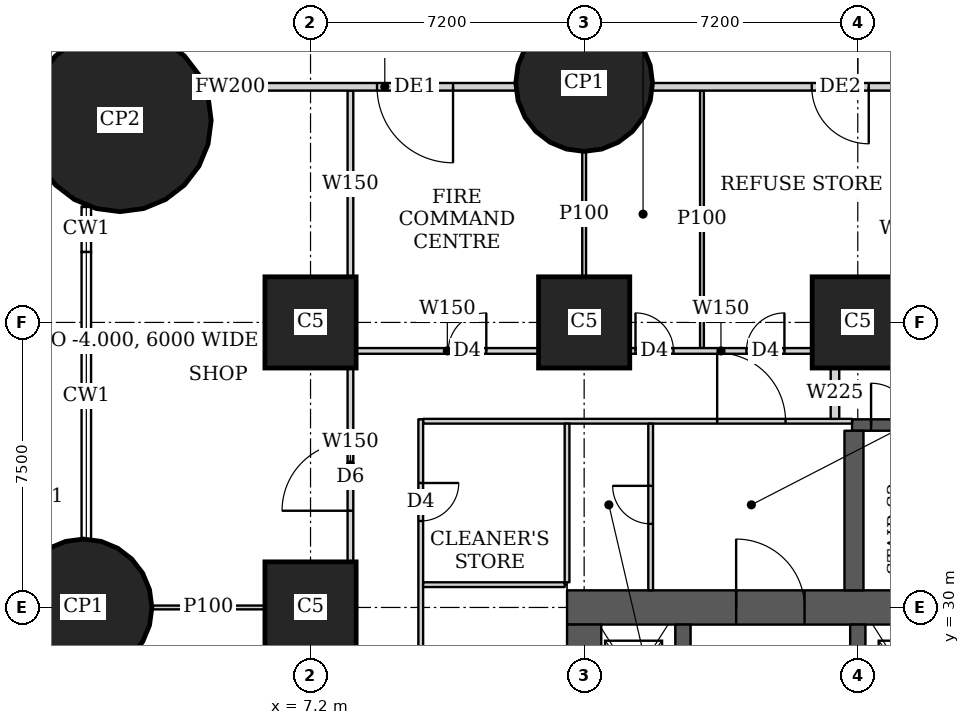
"""IFC4 building model, lengths in metres.
Left out: names, types, materials, properties, quantities, classifications, styles, units other than length and angle.
Written with IfcOpenShell. Run it as: python <this file> out.ifc"""

import sys

from ifc_helpers import new_model, si_unit, direction, frame, frame_2d, origin, origin_2d, place, context, subcontext, project, spatial, rectangle, circle, extrude, element, fill, save


model = new_model("IFC4")
c1 = context("Model", 3, precision=1e-05, world=origin(), true_north=direction((0.0, 1.0)))
c2 = subcontext(c1, "Body", "Model", "MODEL_VIEW")
j1 = project(units=[si_unit("LENGTHUNIT", "METRE"), si_unit("PLANEANGLEUNIT", "RADIAN")], contexts=[c1])
p1 = place(None, origin())
s1 = spatial("IfcSite", under=j1, at=p1, CompositionType="ELEMENT")
p2 = place(p1, origin())
s2 = spatial("IfcBuilding", under=s1, at=p2, CompositionType="ELEMENT")
p3 = place(p2, origin())
s3 = spatial("IfcBuildingStorey", under=s2, at=p3, CompositionType="ELEMENT", Elevation=0.0)
p4 = place(p3, frame((1.225, 30.0, 0.0), z_axis=(0.0, 0.0, 1.0), x_axis=(1.0, 0.0, 0.0)))
e1 = element("IfcColumn", 1, at=p4, inside=s3, PredefinedType="COLUMN", context=c2, shape_type="SweptSolid", body=[
    extrude(circle(Radius=1.8, at=origin_2d()), origin(), (0.0, 0.0, 1.0), 5.6),
])
for number, where, z_axis, x_axis in (
    (2, (7.2, 30.0, 0.0), (0.0, 0.0, 1.0), (1.0, 0.0, 0.0)),
    (3, (7.2, 37.5, 0.0), (0.0, 0.0, 1.0), (1.0, 0.0, 0.0)),
    (4, (14.4, 37.5, 0.0), (0.0, 0.0, 1.0), (1.0, 0.0, 0.0)),
    (5, (21.6, 37.5, 0.0), (0.0, 0.0, 1.0), (1.0, 0.0, 0.0)),
):
    element("IfcColumn", number, at=place(p3, frame(where, z_axis=z_axis, x_axis=x_axis)), inside=s3, PredefinedType="COLUMN", context=c2, shape_type="SweptSolid", body=[
        extrude(rectangle(XDim=2.4, YDim=2.4, at=origin_2d()), origin(), (0.0, 0.0, 1.0), 5.6),
    ])
p5 = place(p3, frame((2.186, 42.814, 0.0), z_axis=(0.0, 0.0, 1.0), x_axis=(1.0, 0.0, 0.0)))
e6 = element("IfcColumn", 6, at=p5, inside=s3, PredefinedType="COLUMN", context=c2, shape_type="SweptSolid", body=[
    extrude(circle(Radius=2.4, at=origin_2d()), origin(), (0.0, 0.0, 1.0), 5.6),
])
p6 = place(p3, frame((14.4, 43.8, 0.0), z_axis=(0.0, 0.0, 1.0), x_axis=(1.0, 0.0, 0.0)))
e7 = element("IfcColumn", 7, at=p6, inside=s3, PredefinedType="COLUMN", context=c2, shape_type="SweptSolid", body=[
    extrude(circle(Radius=1.8, at=origin_2d()), origin(), (0.0, 0.0, 1.0), 5.6),
])
p7 = place(p3, frame((13.95, 30.0, 0.0), z_axis=(0.0, 0.0, 1.0), x_axis=(1.0, 0.0, 0.0)))
e8 = element("IfcWall", 8, at=p7, inside=s3, PredefinedType="SHEAR", context=c2, shape_type="SweptSolid", body=[
    extrude(rectangle(XDim=15.3, YDim=0.9, at=frame_2d((7.65, 0.0))), origin(), (0.0, 0.0, 1.0), 5.6),
])
p8 = place(p7, frame((4.45, 0.0, 0.0)))
e9 = element("IfcOpeningElement", 9, at=p8, cuts=e8, PredefinedType="OPENING", context=c2, shape_type="SweptSolid", body=[
    extrude(rectangle(XDim=1.8, YDim=2.1, at=frame_2d((0.9, 1.05))), frame((0.0, 0.46, 0.0), z_axis=(0.0, -1.0, 0.0), x_axis=(1.0, 0.0, 0.0)), (0.0, 0.0, 1.0), 0.92),
])
p9 = place(p7, frame((10.7, 0.0, 0.0)))
e10 = element("IfcOpeningElement", 10, at=p9, cuts=e8, PredefinedType="OPENING", context=c2, shape_type="SweptSolid", body=[
    extrude(rectangle(XDim=1.1, YDim=2.1, at=frame_2d((0.55, 1.05))), frame((0.0, 0.46, 0.0), z_axis=(0.0, -1.0, 0.0), x_axis=(1.0, 0.0, 0.0)), (0.0, 0.0, 1.0), 0.92),
])
p10 = place(p3, frame((14.4, 15.45, 0.0), z_axis=(0.0, 0.0, 1.0), x_axis=(0.0, 1.0, 0.0)))
e11 = element("IfcWall", 11, at=p10, inside=s3, PredefinedType="SHEAR", context=c2, shape_type="SweptSolid", body=[
    extrude(rectangle(XDim=14.1, YDim=0.9, at=frame_2d((7.05, 0.0))), origin(), (0.0, 0.0, 1.0), 5.6),
])
p11 = place(p3, frame((17.0, 15.45, 0.0), z_axis=(0.0, 0.0, 1.0), x_axis=(0.0, 1.0, 0.0)))
e12 = element("IfcWall", 12, at=p11, inside=s3, PredefinedType="SHEAR", context=c2, shape_type="SweptSolid", body=[
    extrude(rectangle(XDim=14.1, YDim=0.4, at=frame_2d((7.05, 0.0))), origin(), (0.0, 0.0, 1.0), 5.6),
])
p12 = place(p11, frame((0.875, 0.0, 0.0)))
e13 = element("IfcOpeningElement", 13, at=p12, cuts=e12, PredefinedType="OPENING", context=c2, shape_type="SweptSolid", body=[
    extrude(rectangle(XDim=1.1, YDim=2.1, at=frame_2d((0.55, 1.05))), frame((0.0, 0.21, 0.0), z_axis=(0.0, -1.0, 0.0), x_axis=(1.0, 0.0, 0.0)), (0.0, 0.0, 1.0), 0.42),
])
p13 = place(p11, frame((4.625, 0.0, 0.0)))
e14 = element("IfcOpeningElement", 14, at=p13, cuts=e12, PredefinedType="OPENING", context=c2, shape_type="SweptSolid", body=[
    extrude(rectangle(XDim=1.1, YDim=2.1, at=frame_2d((0.55, 1.05))), frame((0.0, 0.21, 0.0), z_axis=(0.0, -1.0, 0.0), x_axis=(1.0, 0.0, 0.0)), (0.0, 0.0, 1.0), 0.42),
])
p14 = place(p11, frame((8.375, 0.0, 0.0)))
e15 = element("IfcOpeningElement", 15, at=p14, cuts=e12, PredefinedType="OPENING", context=c2, shape_type="SweptSolid", body=[
    extrude(rectangle(XDim=1.1, YDim=2.1, at=frame_2d((0.55, 1.05))), frame((0.0, 0.21, 0.0), z_axis=(0.0, -1.0, 0.0), x_axis=(1.0, 0.0, 0.0)), (0.0, 0.0, 1.0), 0.42),
])
p15 = place(p11, frame((12.125, 0.0, 0.0)))
e16 = element("IfcOpeningElement", 16, at=p15, cuts=e12, PredefinedType="OPENING", context=c2, shape_type="SweptSolid", body=[
    extrude(rectangle(XDim=1.1, YDim=2.1, at=frame_2d((0.55, 1.05))), frame((0.0, 0.21, 0.0), z_axis=(0.0, -1.0, 0.0), x_axis=(1.0, 0.0, 0.0)), (0.0, 0.0, 1.0), 0.42),
])
p16 = place(p3, frame((21.6, 15.45, 0.0), z_axis=(0.0, 0.0, 1.0), x_axis=(0.0, 1.0, 0.0)))
e17 = element("IfcWall", 17, at=p16, inside=s3, PredefinedType="SHEAR", context=c2, shape_type="SweptSolid", body=[
    extrude(rectangle(XDim=14.1, YDim=0.4, at=frame_2d((7.05, 0.0))), origin(), (0.0, 0.0, 1.0), 5.6),
])
p17 = place(p16, frame((0.875, 0.0, 0.0)))
e18 = element("IfcOpeningElement", 18, at=p17, cuts=e17, PredefinedType="OPENING", context=c2, shape_type="SweptSolid", body=[
    extrude(rectangle(XDim=1.1, YDim=2.1, at=frame_2d((0.55, 1.05))), frame((0.0, 0.21, 0.0), z_axis=(0.0, -1.0, 0.0), x_axis=(1.0, 0.0, 0.0)), (0.0, 0.0, 1.0), 0.42),
])
p18 = place(p16, frame((4.625, 0.0, 0.0)))
e19 = element("IfcOpeningElement", 19, at=p18, cuts=e17, PredefinedType="OPENING", context=c2, shape_type="SweptSolid", body=[
    extrude(rectangle(XDim=1.1, YDim=2.1, at=frame_2d((0.55, 1.05))), frame((0.0, 0.21, 0.0), z_axis=(0.0, -1.0, 0.0), x_axis=(1.0, 0.0, 0.0)), (0.0, 0.0, 1.0), 0.42),
])
p19 = place(p16, frame((8.375, 0.0, 0.0)))
e20 = element("IfcOpeningElement", 20, at=p19, cuts=e17, PredefinedType="OPENING", context=c2, shape_type="SweptSolid", body=[
    extrude(rectangle(XDim=1.1, YDim=2.1, at=frame_2d((0.55, 1.05))), frame((0.0, 0.21, 0.0), z_axis=(0.0, -1.0, 0.0), x_axis=(1.0, 0.0, 0.0)), (0.0, 0.0, 1.0), 0.42),
])
p20 = place(p16, frame((12.125, 0.0, 0.0)))
e21 = element("IfcOpeningElement", 21, at=p20, cuts=e17, PredefinedType="OPENING", context=c2, shape_type="SweptSolid", body=[
    extrude(rectangle(XDim=1.1, YDim=2.1, at=frame_2d((0.55, 1.05))), frame((0.0, 0.21, 0.0), z_axis=(0.0, -1.0, 0.0), x_axis=(1.0, 0.0, 0.0)), (0.0, 0.0, 1.0), 0.42),
])
p21 = place(p3, frame((21.45, 34.8, 0.0), z_axis=(0.0, 0.0, 1.0), x_axis=(1.0, 0.0, 0.0)))
e22 = element("IfcWall", 22, at=p21, inside=s3, PredefinedType="SHEAR", context=c2, shape_type="SweptSolid", body=[
    extrude(rectangle(XDim=7.5, YDim=0.3, at=frame_2d((3.75, 0.0))), origin(), (0.0, 0.0, 1.0), 5.6),
])
p22 = place(p21, frame((0.5, 0.0, 0.0)))
e23 = element("IfcOpeningElement", 23, at=p22, cuts=e22, PredefinedType="OPENING", context=c2, shape_type="SweptSolid", body=[
    extrude(rectangle(XDim=1.1, YDim=2.1, at=frame_2d((0.55, 1.05))), frame((0.0, 0.16, 0.0), z_axis=(0.0, -1.0, 0.0), x_axis=(1.0, 0.0, 0.0)), (0.0, 0.0, 1.0), 0.32),
])
p23 = place(p3, frame((21.5, 30.45, 0.0), z_axis=(0.0, 0.0, 1.0), x_axis=(0.0, 1.0, 0.0)))
e24 = element("IfcWall", 24, at=p23, inside=s3, PredefinedType="SHEAR", context=c2, shape_type="SweptSolid", body=[
    extrude(rectangle(XDim=4.2, YDim=0.5, at=frame_2d((2.1, 0.0))), origin(), (0.0, 0.0, 1.0), 5.6),
])
p24 = place(p3, frame((26.999, 43.7, 0.0), z_axis=(0.0, 0.0, 1.0), x_axis=(-1.0, 0.0, 0.0)))
e25 = element("IfcWall", 25, at=p24, inside=s3, PredefinedType="SOLIDWALL", context=c2, shape_type="SweptSolid", body=[
    extrude(rectangle(XDim=10.798, YDim=0.2, at=frame_2d((5.399, 0.0))), origin(), (0.0, 0.0, 1.0), 3.5),
])
p25 = place(p24, frame((5.11, 0.0, 0.0)))
e26 = element("IfcOpeningElement", 26, at=p25, cuts=e25, PredefinedType="OPENING", context=c2, shape_type="SweptSolid", body=[
    extrude(rectangle(XDim=1.5, YDim=2.4, at=frame_2d((0.75, 1.2))), frame((0.0, 0.11, 0.0), z_axis=(0.0, -1.0, 0.0), x_axis=(1.0, 0.0, 0.0)), (0.0, 0.0, 1.0), 0.22),
])
p26 = place(p24, frame((2.291, 0.0, 0.0)))
e27 = element("IfcOpeningElement", 27, at=p26, cuts=e25, PredefinedType="OPENING", context=c2, shape_type="SweptSolid", body=[
    extrude(rectangle(XDim=1.5, YDim=2.4, at=frame_2d((0.75, 1.2))), frame((0.0, 0.11, 0.0), z_axis=(0.0, -1.0, 0.0), x_axis=(1.0, 0.0, 0.0)), (0.0, 0.0, 1.0), 0.22),
])
p27 = place(p3, frame((12.599, 43.7, 0.0), z_axis=(0.0, 0.0, 1.0), x_axis=(-1.0, 0.0, 0.0)))
e28 = element("IfcWall", 28, at=p27, inside=s3, PredefinedType="SOLIDWALL", context=c2, shape_type="SweptSolid", body=[
    extrude(rectangle(XDim=6.89, YDim=0.2, at=frame_2d((3.445, 0.0))), origin(), (0.0, 0.0, 1.0), 3.5),
])
p28 = place(p27, frame((1.649, 0.0, 0.0)))
e29 = element("IfcOpeningElement", 29, at=p28, cuts=e28, PredefinedType="OPENING", context=c2, shape_type="SweptSolid", body=[
    extrude(rectangle(XDim=2.0, YDim=2.4, at=frame_2d((1.0, 1.2))), frame((0.0, 0.11, 0.0), z_axis=(0.0, -1.0, 0.0), x_axis=(1.0, 0.0, 0.0)), (0.0, 0.0, 1.0), 0.22),
])
p29 = place(p3, frame((5.709, 43.7, 0.0), z_axis=(0.0, 0.0, 1.0), x_axis=(-1.0, 0.0, 0.0)))
e30 = element("IfcWall", 30, at=p29, inside=s3, PredefinedType="SOLIDWALL", context=c2, shape_type="SweptSolid", body=[
    extrude(rectangle(XDim=1.247, YDim=0.2, at=frame_2d((0.624, 0.0))), origin(), (0.0, 0.0, 1.0), 5.3),
])
p30 = place(p3, frame((8.25, 31.201, 0.0), z_axis=(0.0, 0.0, 1.0), x_axis=(0.0, 1.0, 0.0)))
e31 = element("IfcWall", 31, at=p30, inside=s3, PredefinedType="SOLIDWALL", context=c2, shape_type="SweptSolid", body=[
    extrude(rectangle(XDim=5.098, YDim=0.15, at=frame_2d((2.549, 0.0))), origin(), (0.0, 0.0, 1.0), 5.3),
])
p31 = place(p30, frame((1.344, 0.0, 0.0)))
e32 = element("IfcOpeningElement", 32, at=p31, cuts=e31, PredefinedType="OPENING", context=c2, shape_type="SweptSolid", body=[
    extrude(rectangle(XDim=1.8, YDim=2.1, at=frame_2d((0.9, 1.05))), frame((0.0, 0.085, 0.0), z_axis=(0.0, -1.0, 0.0), x_axis=(1.0, 0.0, 0.0)), (0.0, 0.0, 1.0), 0.17),
])
p32 = place(p3, frame((8.25, 38.701, 0.0), z_axis=(0.0, 0.0, 1.0), x_axis=(0.0, 1.0, 0.0)))
e33 = element("IfcWall", 33, at=p32, inside=s3, PredefinedType="SOLIDWALL", context=c2, shape_type="SweptSolid", body=[
    extrude(rectangle(XDim=4.899, YDim=0.15, at=frame_2d((2.45, 0.0))), origin(), (0.0, 0.0, 1.0), 3.5),
])
p33 = place(p3, frame((8.401, 36.75, 0.0), z_axis=(0.0, 0.0, 1.0), x_axis=(1.0, 0.0, 0.0)))
e34 = element("IfcWall", 34, at=p33, inside=s3, PredefinedType="SOLIDWALL", context=c2, shape_type="SweptSolid", body=[
    extrude(rectangle(XDim=4.798, YDim=0.15, at=frame_2d((2.399, 0.0))), origin(), (0.0, 0.0, 1.0), 3.7),
])
p34 = place(p33, frame((2.424, 0.0, 0.0)))
e35 = element("IfcOpeningElement", 35, at=p34, cuts=e34, PredefinedType="OPENING", context=c2, shape_type="SweptSolid", body=[
    extrude(rectangle(XDim=1.0, YDim=2.1, at=frame_2d((0.5, 1.05))), frame((0.0, 0.085, 0.0), z_axis=(0.0, -1.0, 0.0), x_axis=(1.0, 0.0, 0.0)), (0.0, 0.0, 1.0), 0.17),
])
p35 = place(p3, frame((15.601, 36.75, 0.0), z_axis=(0.0, 0.0, 1.0), x_axis=(1.0, 0.0, 0.0)))
e36 = element("IfcWall", 36, at=p35, inside=s3, PredefinedType="SOLIDWALL", context=c2, shape_type="SweptSolid", body=[
    extrude(rectangle(XDim=4.798, YDim=0.15, at=frame_2d((2.399, 0.0))), origin(), (0.0, 0.0, 1.0), 3.7),
])
p36 = place(p35, frame((0.15, 0.0, 0.0)))
e37 = element("IfcOpeningElement", 37, at=p36, cuts=e36, PredefinedType="OPENING", context=c2, shape_type="SweptSolid", body=[
    extrude(rectangle(XDim=1.0, YDim=2.1, at=frame_2d((0.5, 1.05))), frame((0.0, 0.085, 0.0), z_axis=(0.0, -1.0, 0.0), x_axis=(1.0, 0.0, 0.0)), (0.0, 0.0, 1.0), 0.17),
])
p37 = place(p35, frame((3.069, 0.0, 0.0)))
e38 = element("IfcOpeningElement", 38, at=p37, cuts=e36, PredefinedType="OPENING", context=c2, shape_type="SweptSolid", body=[
    extrude(rectangle(XDim=1.0, YDim=2.1, at=frame_2d((0.5, 1.05))), frame((0.0, 0.085, 0.0), z_axis=(0.0, -1.0, 0.0), x_axis=(1.0, 0.0, 0.0)), (0.0, 0.0, 1.0), 0.17),
])
p38 = place(p3, frame((3.026, 30.0, 0.0), z_axis=(0.0, 0.0, 1.0), x_axis=(1.0, 0.0, 0.0)))
e39 = element("IfcWall", 39, at=p38, inside=s3, PredefinedType="PARTITIONING", context=c2, shape_type="SweptSolid", body=[
    extrude(rectangle(XDim=2.973, YDim=0.1, at=frame_2d((1.487, 0.0))), origin(), (0.0, 0.0, 1.0), 3.7),
])
p39 = place(p3, frame((14.4, 38.701, 0.0), z_axis=(0.0, 0.0, 1.0), x_axis=(0.0, 1.0, 0.0)))
e40 = element("IfcWall", 40, at=p39, inside=s3, PredefinedType="PARTITIONING", context=c2, shape_type="SweptSolid", body=[
    extrude(rectangle(XDim=3.298, YDim=0.1, at=frame_2d((1.649, 0.0))), origin(), (0.0, 0.0, 1.0), 3.7),
])
p40 = place(p3, frame((17.5, 36.825, 0.0), z_axis=(0.0, 0.0, 1.0), x_axis=(0.0, 1.0, 0.0)))
e41 = element("IfcWall", 41, at=p40, inside=s3, PredefinedType="PARTITIONING", context=c2, shape_type="SweptSolid", body=[
    extrude(rectangle(XDim=6.775, YDim=0.1, at=frame_2d((3.388, 0.0))), origin(), (0.0, 0.0, 1.0), 3.5),
])
p41 = place(p3, frame((10.1, 10.05, 0.0), z_axis=(0.0, 0.0, 1.0), x_axis=(0.0, 1.0, 0.0)))
e42 = element("IfcWall", 42, at=p41, inside=s3, PredefinedType="PARTITIONING", context=c2, shape_type="SweptSolid", body=[
    extrude(rectangle(XDim=24.9, YDim=0.125, at=frame_2d((12.45, 0.0))), origin(), (0.0, 0.0, 1.0), 3.7),
])
p42 = place(p41, frame((1.675, 0.0, 0.0)))
e43 = element("IfcOpeningElement", 43, at=p42, cuts=e42, PredefinedType="OPENING", context=c2, shape_type="SweptSolid", body=[
    extrude(rectangle(XDim=1.0, YDim=2.1, at=frame_2d((0.5, 1.05))), frame((0.0, 0.073, 0.0), z_axis=(0.0, -1.0, 0.0), x_axis=(1.0, 0.0, 0.0)), (0.0, 0.0, 1.0), 0.145),
])
p43 = place(p41, frame((16.0, 0.0, 0.0)))
e44 = element("IfcOpeningElement", 44, at=p43, cuts=e42, PredefinedType="OPENING", context=c2, shape_type="SweptSolid", body=[
    extrude(rectangle(XDim=1.0, YDim=2.1, at=frame_2d((0.5, 1.05))), frame((0.0, 0.073, 0.0), z_axis=(0.0, -1.0, 0.0), x_axis=(1.0, 0.0, 0.0)), (0.0, 0.0, 1.0), 0.145),
])
p44 = place(p41, frame((22.225, 0.0, 0.0)))
e45 = element("IfcOpeningElement", 45, at=p44, cuts=e42, PredefinedType="OPENING", context=c2, shape_type="SweptSolid", body=[
    extrude(rectangle(XDim=1.0, YDim=2.1, at=frame_2d((0.5, 1.05))), frame((0.0, 0.073, 0.0), z_axis=(0.0, -1.0, 0.0), x_axis=(1.0, 0.0, 0.0)), (0.0, 0.0, 1.0), 0.145),
])
p45 = place(p41, frame((6.025, 0.0, 0.0)))
e46 = element("IfcOpeningElement", 46, at=p45, cuts=e42, PredefinedType="OPENING", context=c2, shape_type="SweptSolid", body=[
    extrude(rectangle(XDim=1.0, YDim=2.1, at=frame_2d((0.5, 1.05))), frame((0.0, 0.073, 0.0), z_axis=(0.0, -1.0, 0.0), x_axis=(1.0, 0.0, 0.0)), (0.0, 0.0, 1.0), 0.145),
])
p46 = place(p41, frame((10.075, 0.0, 0.0)))
e47 = element("IfcOpeningElement", 47, at=p46, cuts=e42, PredefinedType="OPENING", context=c2, shape_type="SweptSolid", body=[
    extrude(rectangle(XDim=1.0, YDim=2.1, at=frame_2d((0.5, 1.05))), frame((0.0, 0.073, 0.0), z_axis=(0.0, -1.0, 0.0), x_axis=(1.0, 0.0, 0.0)), (0.0, 0.0, 1.0), 0.145),
])
p47 = place(p3, frame((10.163, 30.6, 0.0), z_axis=(0.0, 0.0, 1.0), x_axis=(1.0, 0.0, 0.0)))
e48 = element("IfcWall", 48, at=p47, inside=s3, PredefinedType="PARTITIONING", context=c2, shape_type="SweptSolid", body=[
    extrude(rectangle(XDim=3.725, YDim=0.125, at=frame_2d((1.862, 0.0))), origin(), (0.0, 0.0, 1.0), 3.7),
])
p48 = place(p3, frame((13.95, 30.663, 0.0), z_axis=(0.0, 0.0, 1.0), x_axis=(0.0, 1.0, 0.0)))
e49 = element("IfcWall", 49, at=p48, inside=s3, PredefinedType="PARTITIONING", context=c2, shape_type="SweptSolid", body=[
    extrude(rectangle(XDim=4.174, YDim=0.125, at=frame_2d((2.087, 0.0))), origin(), (0.0, 0.0, 1.0), 3.7),
])
p49 = place(p3, frame((10.163, 34.9, 0.0), z_axis=(0.0, 0.0, 1.0), x_axis=(1.0, 0.0, 0.0)))
e50 = element("IfcWall", 50, at=p49, inside=s3, PredefinedType="PARTITIONING", context=c2, shape_type="SweptSolid", body=[
    extrude(rectangle(XDim=11.287, YDim=0.125, at=frame_2d((5.644, 0.0))), origin(), (0.0, 0.0, 1.0), 3.3),
])
p50 = place(p49, frame((7.737, 0.0, 0.0)))
e51 = element("IfcOpeningElement", 51, at=p50, cuts=e50, PredefinedType="OPENING", context=c2, shape_type="SweptSolid", body=[
    extrude(rectangle(XDim=1.8, YDim=2.1, at=frame_2d((0.9, 1.05))), frame((0.0, 0.073, 0.0), z_axis=(0.0, -1.0, 0.0), x_axis=(1.0, 0.0, 0.0)), (0.0, 0.0, 1.0), 0.145),
])
p51 = place(p3, frame((16.15, 30.45, 0.0), z_axis=(0.0, 0.0, 1.0), x_axis=(0.0, 1.0, 0.0)))
e52 = element("IfcWall", 52, at=p51, inside=s3, PredefinedType="PARTITIONING", context=c2, shape_type="SweptSolid", body=[
    extrude(rectangle(XDim=4.387, YDim=0.125, at=frame_2d((2.193, 0.0))), origin(), (0.0, 0.0, 1.0), 5.3),
])
p52 = place(p51, frame((1.75, 0.0, 0.0)))
e53 = element("IfcOpeningElement", 53, at=p52, cuts=e52, PredefinedType="OPENING", context=c2, shape_type="SweptSolid", body=[
    extrude(rectangle(XDim=1.0, YDim=2.1, at=frame_2d((0.5, 1.05))), frame((0.0, 0.073, 0.0), z_axis=(0.0, -1.0, 0.0), x_axis=(1.0, 0.0, 0.0)), (0.0, 0.0, 1.0), 0.145),
])
p53 = place(p3, frame((21.0, 34.963, 0.0), z_axis=(0.0, 0.0, 1.0), x_axis=(0.0, 1.0, 0.0)))
e54 = element("IfcWall", 54, at=p53, inside=s3, PredefinedType="SOLIDWALL", context=c2, shape_type="SweptSolid", body=[
    extrude(rectangle(XDim=1.337, YDim=0.225, at=frame_2d((0.668, 0.0))), origin(), (0.0, 0.0, 1.0), 3.3),
])
p54 = place(p25, origin())
e55 = element("IfcDoor", 55, at=p54, inside=s3, OperationType="DOUBLE_DOOR_SINGLE_SWING", PredefinedType="DOOR", context=c2, shape_type="SweptSolid", body=[
    extrude(rectangle(XDim=1.5, YDim=2.4, at=frame_2d((0.75, 1.2))), frame((0.0, 0.025, 0.0), z_axis=(0.0, -1.0, 0.0), x_axis=(1.0, 0.0, 0.0)), (0.0, 0.0, 1.0), 0.05),
])
fill(e26, e55)
p55 = place(p28, origin())
e56 = element("IfcDoor", 56, at=p55, inside=s3, OperationType="DOUBLE_DOOR_SINGLE_SWING", PredefinedType="DOOR", context=c2, shape_type="SweptSolid", body=[
    extrude(rectangle(XDim=2.0, YDim=2.4, at=frame_2d((1.0, 1.2))), frame((0.0, 0.025, 0.0), z_axis=(0.0, -1.0, 0.0), x_axis=(1.0, 0.0, 0.0)), (0.0, 0.0, 1.0), 0.05),
])
fill(e29, e56)
p56 = place(p31, origin())
e57 = element("IfcDoor", 57, at=p56, inside=s3, OperationType="DOUBLE_DOOR_SINGLE_SWING", PredefinedType="DOOR", context=c2, shape_type="SweptSolid", body=[
    extrude(rectangle(XDim=1.8, YDim=2.1, at=frame_2d((0.9, 1.05))), frame((0.0, 0.025, 0.0), z_axis=(0.0, -1.0, 0.0), x_axis=(1.0, 0.0, 0.0)), (0.0, 0.0, 1.0), 0.05),
])
fill(e32, e57)
p57 = place(p34, origin())
e58 = element("IfcDoor", 58, at=p57, inside=s3, OperationType="SINGLE_SWING_RIGHT", PredefinedType="DOOR", context=c2, shape_type="SweptSolid", body=[
    extrude(rectangle(XDim=1.0, YDim=2.1, at=frame_2d((0.5, 1.05))), frame((0.0, 0.025, 0.0), z_axis=(0.0, -1.0, 0.0), x_axis=(1.0, 0.0, 0.0)), (0.0, 0.0, 1.0), 0.05),
])
fill(e35, e58)
p58 = place(p36, origin())
e59 = element("IfcDoor", 59, at=p58, inside=s3, OperationType="SINGLE_SWING_LEFT", PredefinedType="DOOR", context=c2, shape_type="SweptSolid", body=[
    extrude(rectangle(XDim=1.0, YDim=2.1, at=frame_2d((0.5, 1.05))), frame((0.0, 0.025, 0.0), z_axis=(0.0, -1.0, 0.0), x_axis=(1.0, 0.0, 0.0)), (0.0, 0.0, 1.0), 0.05),
])
fill(e37, e59)
p59 = place(p37, origin())
e60 = element("IfcDoor", 60, at=p59, inside=s3, OperationType="SINGLE_SWING_RIGHT", PredefinedType="DOOR", context=c2, shape_type="SweptSolid", body=[
    extrude(rectangle(XDim=1.0, YDim=2.1, at=frame_2d((0.5, 1.05))), frame((0.0, 0.025, 0.0), z_axis=(0.0, -1.0, 0.0), x_axis=(1.0, 0.0, 0.0)), (0.0, 0.0, 1.0), 0.05),
])
fill(e38, e60)
p60 = place(p44, origin())
e61 = element("IfcDoor", 61, at=p60, inside=s3, OperationType="SINGLE_SWING_LEFT", PredefinedType="DOOR", context=c2, shape_type="SweptSolid", body=[
    extrude(rectangle(XDim=1.0, YDim=2.1, at=frame_2d((0.5, 1.05))), frame((0.0, 0.025, 0.0), z_axis=(0.0, -1.0, 0.0), x_axis=(1.0, 0.0, 0.0)), (0.0, 0.0, 1.0), 0.05),
])
fill(e45, e61)
p61 = place(p52, origin())
e62 = element("IfcDoor", 62, at=p61, inside=s3, OperationType="SINGLE_SWING_RIGHT", PredefinedType="DOOR", context=c2, shape_type="SweptSolid", body=[
    extrude(rectangle(XDim=1.0, YDim=2.1, at=frame_2d((0.5, 1.05))), frame((0.0, 0.025, 0.0), z_axis=(0.0, -1.0, 0.0), x_axis=(1.0, 0.0, 0.0)), (0.0, 0.0, 1.0), 0.05),
])
fill(e53, e62)
p62 = place(p50, origin())
e63 = element("IfcDoor", 63, at=p62, inside=s3, OperationType="DOUBLE_DOOR_SINGLE_SWING", PredefinedType="DOOR", context=c2, shape_type="SweptSolid", body=[
    extrude(rectangle(XDim=1.8, YDim=2.1, at=frame_2d((0.9, 1.05))), frame((0.0, 0.025, 0.0), z_axis=(0.0, -1.0, 0.0), x_axis=(1.0, 0.0, 0.0)), (0.0, 0.0, 1.0), 0.05),
])
fill(e51, e63)
p63 = place(p8, origin())
e64 = element("IfcDoor", 64, at=p63, inside=s3, OperationType="DOUBLE_DOOR_SINGLE_SWING", PredefinedType="DOOR", context=c2, shape_type="SweptSolid", body=[
    extrude(rectangle(XDim=1.8, YDim=2.1, at=frame_2d((0.9, 1.05))), frame((0.0, 0.025, 0.0), z_axis=(0.0, -1.0, 0.0), x_axis=(1.0, 0.0, 0.0)), (0.0, 0.0, 1.0), 0.05),
])
fill(e9, e64)
p64 = place(p22, origin())
e65 = element("IfcDoor", 65, at=p64, inside=s3, OperationType="SINGLE_SWING_LEFT", PredefinedType="DOOR", context=c2, shape_type="SweptSolid", body=[
    extrude(rectangle(XDim=1.1, YDim=2.1, at=frame_2d((0.55, 1.05))), frame((0.0, 0.025, 0.0), z_axis=(0.0, -1.0, 0.0), x_axis=(1.0, 0.0, 0.0)), (0.0, 0.0, 1.0), 0.05),
])
fill(e23, e65)
save(model, sys.argv[1])
